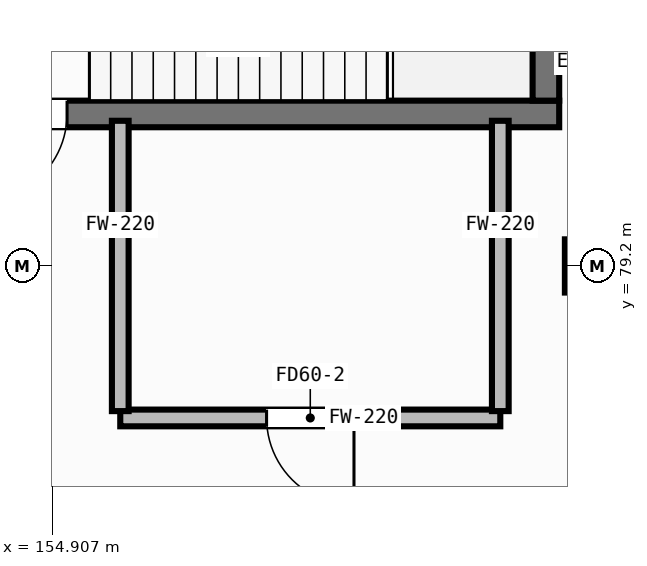
"""IFC4 building model, lengths in metres.
Left out: names, types, materials, properties, quantities, classifications, styles, units other than length and angle.
Written with IfcOpenShell. Run it as: python <this file> out.ifc"""

import sys

from ifc_helpers import new_model, si_unit, direction, frame, frame_2d, origin, origin_2d, place, context, subcontext, project, spatial, rectangle, hollow_rectangle, extrude, element, fill, save


model = new_model("IFC4")
c1 = context("Model", 3, precision=1e-05, world=origin(), true_north=direction((0.0, 1.0)))
c2 = subcontext(c1, "Body", "Model", "MODEL_VIEW")
j1 = project(units=[si_unit("LENGTHUNIT", "METRE"), si_unit("PLANEANGLEUNIT", "RADIAN")], contexts=[c1])
p1 = place(None, origin())
s1 = spatial("IfcSite", under=j1, at=p1, CompositionType="ELEMENT")
p2 = place(p1, origin())
s2 = spatial("IfcBuilding", under=s1, at=p2, CompositionType="ELEMENT")
p3 = place(p2, origin())
s3 = spatial("IfcBuildingStorey", under=s2, at=p3, CompositionType="ELEMENT", Elevation=0.0)
p4 = place(p3, frame((162.0, 79.2, 0.0), z_axis=(0.0, 0.0, 1.0), x_axis=(1.0, 0.0, 0.0)))
e1 = element("IfcColumn", 1, at=p4, inside=s3, PredefinedType="COLUMN", context=c2, shape_type="SweptSolid", body=[
    extrude(hollow_rectangle(XDim=0.7, YDim=0.7, WallThickness=0.028, at=origin_2d()), origin(), (0.0, 0.0, 1.0), 4.8),
])
p5 = place(p3, frame((153.425, 81.2, 0.0), z_axis=(0.0, 0.0, 1.0), x_axis=(1.0, 0.0, 0.0)))
e2 = element("IfcWall", 2, at=p5, inside=s3, PredefinedType="SHEAR", context=c2, shape_type="SweptSolid", body=[
    extrude(rectangle(XDim=8.15, YDim=0.35, at=frame_2d((4.075, 0.0))), origin(), (0.0, 0.0, 1.0), 4.555),
])
p6 = place(p5, frame((0.525, 0.0, 0.0)))
e3 = element("IfcOpeningElement", 3, at=p6, cuts=e2, PredefinedType="OPENING", context=c2, shape_type="SweptSolid", body=[
    extrude(rectangle(XDim=1.15, YDim=2.1, at=frame_2d((0.575, 1.05))), frame((0.0, 0.187, 0.0), z_axis=(0.0, -1.0, 0.0), x_axis=(1.0, 0.0, 0.0)), (0.0, 0.0, 1.0), 0.374),
])
p7 = place(p3, frame((161.4, 81.375, 0.0), z_axis=(0.0, 0.0, 1.0), x_axis=(0.0, 1.0, 0.0)))
e4 = element("IfcWall", 4, at=p7, inside=s3, PredefinedType="SHEAR", context=c2, shape_type="SweptSolid", body=[
    extrude(rectangle(XDim=3.55, YDim=0.35, at=frame_2d((1.775, 0.0))), origin(), (0.0, 0.0, 1.0), 4.555),
])
p8 = place(p3, frame((155.8, 77.2, 0.0), z_axis=(0.0, 0.0, 1.0), x_axis=(1.0, 0.0, 0.0)))
e5 = element("IfcWall", 5, at=p8, inside=s3, PredefinedType="PARTITIONING", context=c2, shape_type="SweptSolid", body=[
    extrude(rectangle(XDim=5.0, YDim=0.22, at=frame_2d((2.5, 0.0))), origin(), (0.0, 0.0, 1.0), 4.555),
])
p9 = place(p8, frame((1.925, 0.0, 0.0)))
e6 = element("IfcOpeningElement", 6, at=p9, cuts=e5, PredefinedType="OPENING", context=c2, shape_type="SweptSolid", body=[
    extrude(rectangle(XDim=1.15, YDim=2.1, at=frame_2d((0.575, 1.05))), frame((0.0, 0.122, 0.0), z_axis=(0.0, -1.0, 0.0), x_axis=(1.0, 0.0, 0.0)), (0.0, 0.0, 1.0), 0.244),
])
for number, where, z_axis, x_axis in (
    (7, (155.8, 77.29, 0.0), (0.0, 0.0, 1.0), (0.0, 1.0, 0.0)),
    (8, (160.8, 77.29, 0.0), (0.0, 0.0, 1.0), (0.0, 1.0, 0.0)),
):
    element("IfcWall", number, at=place(p3, frame(where, z_axis=z_axis, x_axis=x_axis)), inside=s3, PredefinedType="PARTITIONING", context=c2, shape_type="SweptSolid", body=[
        extrude(rectangle(XDim=3.82, YDim=0.22, at=frame_2d((1.91, 0.0))), origin(), (0.0, 0.0, 1.0), 4.555),
    ])
p10 = place(p6, frame((1.15, 0.0, 0.0), z_axis=(0.0, 0.0, 1.0), x_axis=(-1.0, 0.0, 0.0)))
e9 = element("IfcDoor", 9, at=p10, inside=s3, OperationType="SINGLE_SWING_RIGHT", PredefinedType="DOOR", context=c2, shape_type="SweptSolid", body=[
    extrude(rectangle(XDim=1.15, YDim=2.1, at=frame_2d((0.575, 1.05))), frame((0.0, 0.025, 0.0), z_axis=(0.0, -1.0, 0.0), x_axis=(1.0, 0.0, 0.0)), (0.0, 0.0, 1.0), 0.05),
])
fill(e3, e9)
p11 = place(p9, frame((1.15, 0.0, 0.0), z_axis=(0.0, 0.0, 1.0), x_axis=(-1.0, 0.0, 0.0)))
e10 = element("IfcDoor", 10, at=p11, inside=s3, OperationType="SINGLE_SWING_LEFT", PredefinedType="DOOR", context=c2, shape_type="SweptSolid", body=[
    extrude(rectangle(XDim=1.15, YDim=2.1, at=frame_2d((0.575, 1.05))), frame((0.0, 0.025, 0.0), z_axis=(0.0, -1.0, 0.0), x_axis=(1.0, 0.0, 0.0)), (0.0, 0.0, 1.0), 0.05),
])
fill(e6, e10)
save(model, sys.argv[1])
